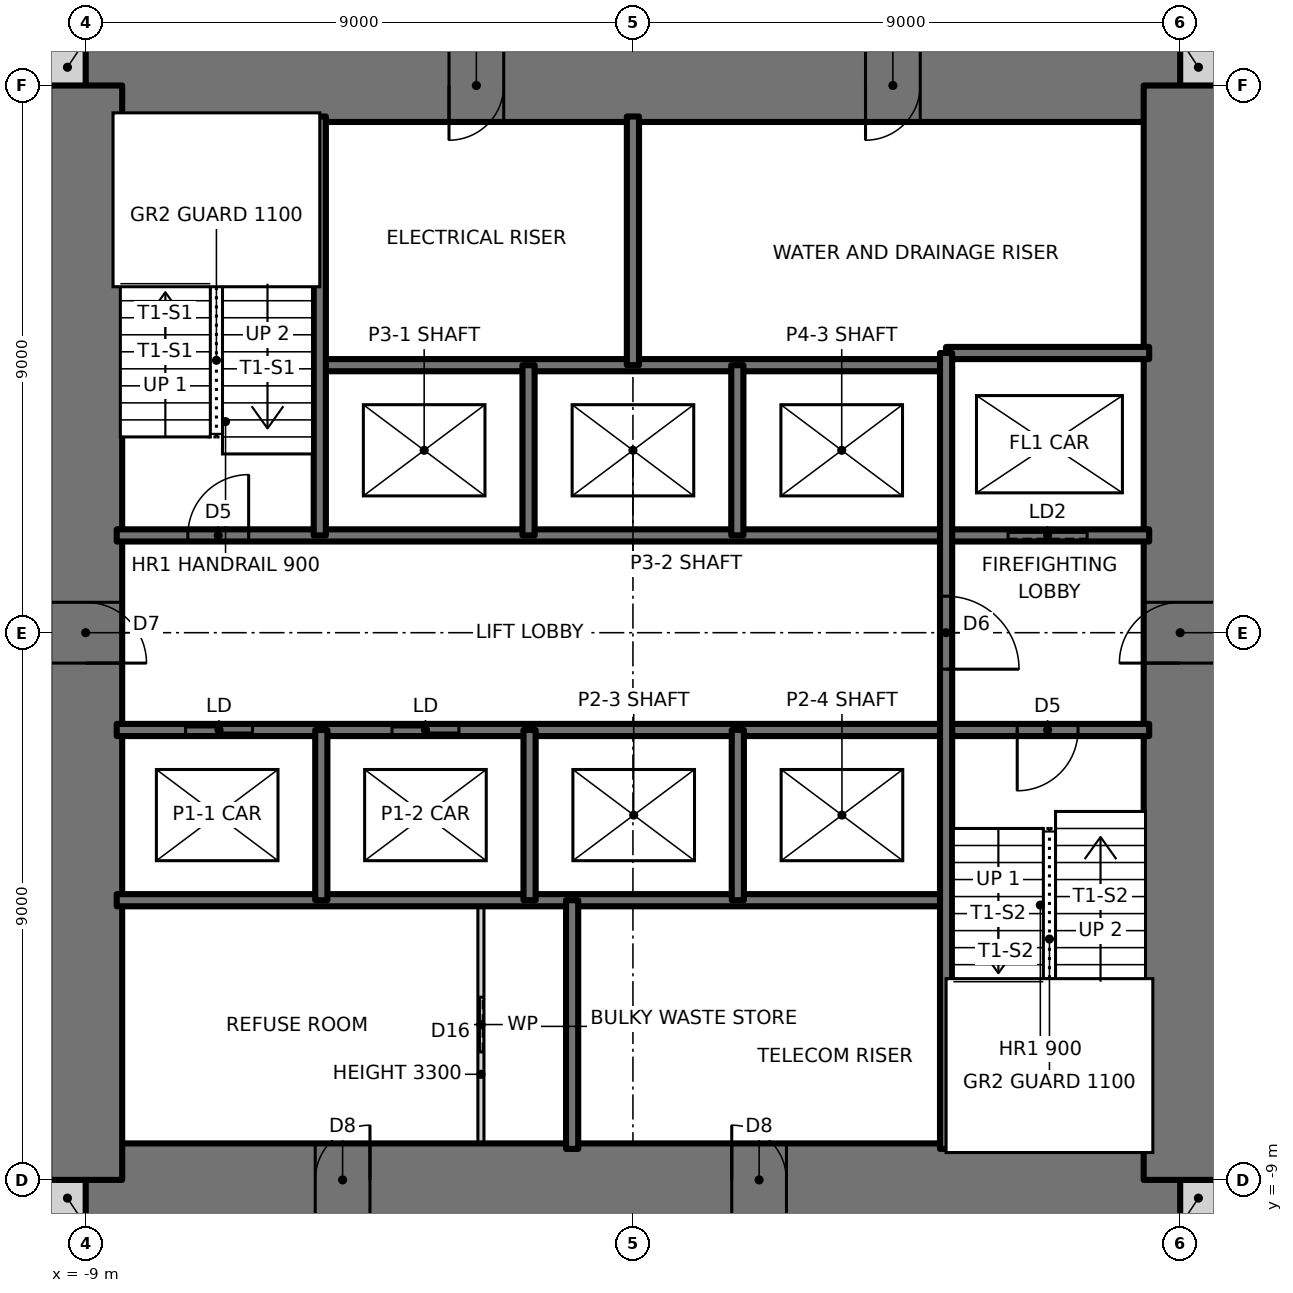
"""IFC4 building model, lengths in metres.
Left out: names, types, materials, properties, quantities, classifications, styles, units other than length and angle.
Written with IfcOpenShell. Run it as: python <this file> out.ifc"""

import sys

from ifc_helpers import new_model, si_unit, direction, frame, frame_2d, origin, place, context, subcontext, project, spatial, rectangle, extrude, element, fill, save


model = new_model("IFC4")
c1 = context("Model", 3, precision=1e-05, world=origin(), true_north=direction((0.0, 1.0)))
c2 = subcontext(c1, "Body", "Model", "MODEL_VIEW")
j1 = project(units=[si_unit("LENGTHUNIT", "METRE"), si_unit("PLANEANGLEUNIT", "RADIAN")], contexts=[c1])
p1 = place(None, origin())
s1 = spatial("IfcSite", under=j1, at=p1, CompositionType="ELEMENT")
p2 = place(p1, origin())
s2 = spatial("IfcBuilding", under=s1, at=p2, CompositionType="ELEMENT")
p3 = place(p2, frame((0.0, 0.0, 43.0)))
s3 = spatial("IfcBuildingStorey", under=s2, at=p3, CompositionType="ELEMENT", Elevation=43.0)
for number, where, z_axis, x_axis in (
    (1, (-9.6, -9.3, 0.0), (0.0, 0.0, 1.0), (1.0, 0.0, 0.0)),
    (2, (9.0, -9.3, 0.0), (0.0, 0.0, 1.0), (1.0, 0.0, 0.0)),
    (3, (9.0, 9.3, 0.0), (0.0, 0.0, 1.0), (1.0, 0.0, 0.0)),
    (4, (-9.6, 9.3, 0.0), (0.0, 0.0, 1.0), (1.0, 0.0, 0.0)),
):
    element("IfcWall", number, at=place(p3, frame(where, z_axis=z_axis, x_axis=x_axis)), inside=s3, PredefinedType="SOLIDWALL", context=c2, shape_type="SweptSolid", body=[
        extrude(rectangle(XDim=0.6, YDim=0.6, at=frame_2d((0.3, 0.0))), origin(), (0.0, 0.0, 1.0), 3.5),
    ])
p4 = place(p3, frame((-9.0, -9.0, 0.0), z_axis=(0.0, 0.0, 1.0), x_axis=(1.0, 0.0, 0.0)))
e5 = element("IfcWall", 5, at=p4, inside=s3, PredefinedType="SHEAR", context=c2, shape_type="SweptSolid", body=[
    extrude(rectangle(XDim=18.0, YDim=1.2, at=frame_2d((9.0, 0.0))), origin(), (0.0, 0.0, 1.0), 3.5),
])
p5 = place(p4, frame((3.775, 0.0, 0.0)))
e6 = element("IfcOpeningElement", 6, at=p5, cuts=e5, PredefinedType="OPENING", context=c2, shape_type="SweptSolid", body=[
    extrude(rectangle(XDim=0.9, YDim=2.1, at=frame_2d((0.45, 1.05))), frame((0.0, 0.61, 0.0), z_axis=(0.0, -1.0, 0.0), x_axis=(1.0, 0.0, 0.0)), (0.0, 0.0, 1.0), 1.22),
])
p6 = place(p4, frame((10.625, 0.0, 0.0)))
e7 = element("IfcOpeningElement", 7, at=p6, cuts=e5, PredefinedType="OPENING", context=c2, shape_type="SweptSolid", body=[
    extrude(rectangle(XDim=0.9, YDim=2.1, at=frame_2d((0.45, 1.05))), frame((0.0, 0.61, 0.0), z_axis=(0.0, -1.0, 0.0), x_axis=(1.0, 0.0, 0.0)), (0.0, 0.0, 1.0), 1.22),
])
p7 = place(p3, frame((9.0, 9.0, 0.0), z_axis=(0.0, 0.0, 1.0), x_axis=(-1.0, 0.0, 0.0)))
e8 = element("IfcWall", 8, at=p7, inside=s3, PredefinedType="SHEAR", context=c2, shape_type="SweptSolid", body=[
    extrude(rectangle(XDim=18.0, YDim=1.2, at=frame_2d((9.0, 0.0))), origin(), (0.0, 0.0, 1.0), 3.5),
])
p8 = place(p7, frame((11.125, 0.0, 0.0)))
e9 = element("IfcOpeningElement", 9, at=p8, cuts=e8, PredefinedType="OPENING", context=c2, shape_type="SweptSolid", body=[
    extrude(rectangle(XDim=0.9, YDim=2.1, at=frame_2d((0.45, 1.05))), frame((0.0, 0.61, 0.0), z_axis=(0.0, -1.0, 0.0), x_axis=(1.0, 0.0, 0.0)), (0.0, 0.0, 1.0), 1.22),
])
p9 = place(p7, frame((4.275, 0.0, 0.0)))
e10 = element("IfcOpeningElement", 10, at=p9, cuts=e8, PredefinedType="OPENING", context=c2, shape_type="SweptSolid", body=[
    extrude(rectangle(XDim=0.9, YDim=2.1, at=frame_2d((0.45, 1.05))), frame((0.0, 0.61, 0.0), z_axis=(0.0, -1.0, 0.0), x_axis=(1.0, 0.0, 0.0)), (0.0, 0.0, 1.0), 1.22),
])
p10 = place(p3, frame((9.0, -9.0, 0.0), z_axis=(0.0, 0.0, 1.0), x_axis=(0.0, 1.0, 0.0)))
e11 = element("IfcWall", 11, at=p10, inside=s3, PredefinedType="SHEAR", context=c2, shape_type="SweptSolid", body=[
    extrude(rectangle(XDim=18.0, YDim=1.2, at=frame_2d((9.0, 0.0))), origin(), (0.0, 0.0, 1.0), 3.5),
])
p11 = place(p10, frame((8.5, 0.0, 0.0)))
e12 = element("IfcOpeningElement", 12, at=p11, cuts=e11, PredefinedType="OPENING", context=c2, shape_type="SweptSolid", body=[
    extrude(rectangle(XDim=1.0, YDim=2.1, at=frame_2d((0.5, 1.05))), frame((0.0, 0.61, 0.0), z_axis=(0.0, -1.0, 0.0), x_axis=(1.0, 0.0, 0.0)), (0.0, 0.0, 1.0), 1.22),
])
p12 = place(p3, frame((-9.0, 9.0, 0.0), z_axis=(0.0, 0.0, 1.0), x_axis=(0.0, -1.0, 0.0)))
e13 = element("IfcWall", 13, at=p12, inside=s3, PredefinedType="SHEAR", context=c2, shape_type="SweptSolid", body=[
    extrude(rectangle(XDim=18.0, YDim=1.2, at=frame_2d((9.0, 0.0))), origin(), (0.0, 0.0, 1.0), 3.5),
])
p13 = place(p12, frame((8.5, 0.0, 0.0)))
e14 = element("IfcOpeningElement", 14, at=p13, cuts=e13, PredefinedType="OPENING", context=c2, shape_type="SweptSolid", body=[
    extrude(rectangle(XDim=1.0, YDim=2.1, at=frame_2d((0.5, 1.05))), frame((0.0, 0.61, 0.0), z_axis=(0.0, -1.0, 0.0), x_axis=(1.0, 0.0, 0.0)), (0.0, 0.0, 1.0), 1.22),
])
p14 = place(p3, frame((-8.49, -4.4, 0.0), z_axis=(0.0, 0.0, 1.0), x_axis=(1.0, 0.0, 0.0)))
e15 = element("IfcWall", 15, at=p14, inside=s3, PredefinedType="SOLIDWALL", context=c2, shape_type="SweptSolid", body=[
    extrude(rectangle(XDim=13.64, YDim=0.2, at=frame_2d((6.82, 0.0))), origin(), (0.0, 0.0, 1.0), 3.5),
])
p15 = place(p3, frame((-8.49, -1.6, 0.0), z_axis=(0.0, 0.0, 1.0), x_axis=(1.0, 0.0, 0.0)))
e16 = element("IfcWall", 16, at=p15, inside=s3, PredefinedType="SOLIDWALL", context=c2, shape_type="SweptSolid", body=[
    extrude(rectangle(XDim=16.98, YDim=0.2, at=frame_2d((8.49, 0.0))), origin(), (0.0, 0.0, 1.0), 3.5),
])
p16 = place(p15, frame((14.81, 0.0, 0.0)))
e17 = element("IfcOpeningElement", 17, at=p16, cuts=e16, PredefinedType="OPENING", context=c2, shape_type="SweptSolid", body=[
    extrude(rectangle(XDim=1.0, YDim=2.1, at=frame_2d((0.5, 1.05))), frame((0.0, 0.11, 0.0), z_axis=(0.0, -1.0, 0.0), x_axis=(1.0, 0.0, 0.0)), (0.0, 0.0, 1.0), 0.22),
])
p17 = place(p15, frame((1.133, 0.0, 0.0)))
e18 = element("IfcOpeningElement", 18, at=p17, cuts=e16, PredefinedType="OPENING", context=c2, shape_type="SweptSolid", body=[
    extrude(rectangle(XDim=1.1, YDim=2.1, at=frame_2d((0.55, 1.05))), frame((0.0, 0.11, 0.0), z_axis=(0.0, -1.0, 0.0), x_axis=(1.0, 0.0, 0.0)), (0.0, 0.0, 1.0), 0.22),
])
p18 = place(p15, frame((4.528, 0.0, 0.0)))
e19 = element("IfcOpeningElement", 19, at=p18, cuts=e16, PredefinedType="OPENING", context=c2, shape_type="SweptSolid", body=[
    extrude(rectangle(XDim=1.1, YDim=2.1, at=frame_2d((0.55, 1.05))), frame((0.0, 0.11, 0.0), z_axis=(0.0, -1.0, 0.0), x_axis=(1.0, 0.0, 0.0)), (0.0, 0.0, 1.0), 0.22),
])
p19 = place(p3, frame((-8.49, 1.6, 0.0), z_axis=(0.0, 0.0, 1.0), x_axis=(1.0, 0.0, 0.0)))
e20 = element("IfcWall", 20, at=p19, inside=s3, PredefinedType="SOLIDWALL", context=c2, shape_type="SweptSolid", body=[
    extrude(rectangle(XDim=16.98, YDim=0.2, at=frame_2d((8.49, 0.0))), origin(), (0.0, 0.0, 1.0), 3.5),
])
p20 = place(p19, frame((1.17, 0.0, 0.0)))
e21 = element("IfcOpeningElement", 21, at=p20, cuts=e20, PredefinedType="OPENING", context=c2, shape_type="SweptSolid", body=[
    extrude(rectangle(XDim=1.0, YDim=2.1, at=frame_2d((0.5, 1.05))), frame((0.0, 0.11, 0.0), z_axis=(0.0, -1.0, 0.0), x_axis=(1.0, 0.0, 0.0)), (0.0, 0.0, 1.0), 0.22),
])
p21 = place(p19, frame((14.66, 0.0, 0.0)))
e22 = element("IfcOpeningElement", 22, at=p21, cuts=e20, PredefinedType="OPENING", context=c2, shape_type="SweptSolid", body=[
    extrude(rectangle(XDim=1.3, YDim=2.1, at=frame_2d((0.65, 1.05))), frame((0.0, 0.11, 0.0), z_axis=(0.0, -1.0, 0.0), x_axis=(1.0, 0.0, 0.0)), (0.0, 0.0, 1.0), 0.22),
])
p22 = place(p3, frame((-5.15, 4.4, 0.0), z_axis=(0.0, 0.0, 1.0), x_axis=(1.0, 0.0, 0.0)))
e23 = element("IfcWall", 23, at=p22, inside=s3, PredefinedType="SOLIDWALL", context=c2, shape_type="SweptSolid", body=[
    extrude(rectangle(XDim=10.3, YDim=0.2, at=frame_2d((5.15, 0.0))), origin(), (0.0, 0.0, 1.0), 3.5),
])
p23 = place(p3, frame((5.15, 4.6, 0.0), z_axis=(0.0, 0.0, 1.0), x_axis=(1.0, 0.0, 0.0)))
e24 = element("IfcWall", 24, at=p23, inside=s3, PredefinedType="SOLIDWALL", context=c2, shape_type="SweptSolid", body=[
    extrude(rectangle(XDim=3.34, YDim=0.2, at=frame_2d((1.67, 0.0))), origin(), (0.0, 0.0, 1.0), 3.5),
])
p24 = place(p3, frame((5.15, -8.49, 0.0), z_axis=(0.0, 0.0, 1.0), x_axis=(0.0, 1.0, 0.0)))
e25 = element("IfcWall", 25, at=p24, inside=s3, PredefinedType="SOLIDWALL", context=c2, shape_type="SweptSolid", body=[
    extrude(rectangle(XDim=13.09, YDim=0.2, at=frame_2d((6.545, 0.0))), origin(), (0.0, 0.0, 1.0), 3.5),
])
p25 = place(p24, frame((7.89, 0.0, 0.0)))
e26 = element("IfcOpeningElement", 26, at=p25, cuts=e25, PredefinedType="OPENING", context=c2, shape_type="SweptSolid", body=[
    extrude(rectangle(XDim=1.2, YDim=2.1, at=frame_2d((0.6, 1.05))), frame((0.0, 0.11, 0.0), z_axis=(0.0, -1.0, 0.0), x_axis=(1.0, 0.0, 0.0)), (0.0, 0.0, 1.0), 0.22),
])
for number, where, z_axis, x_axis in (
    (27, (1.725, -4.4, 0.0), (0.0, 0.0, 1.0), (0.0, 1.0, 0.0)),
    (28, (1.717, 1.6, 0.0), (0.0, 0.0, 1.0), (0.0, 1.0, 0.0)),
):
    element("IfcWall", number, at=place(p3, frame(where, z_axis=z_axis, x_axis=x_axis)), inside=s3, PredefinedType="SOLIDWALL", context=c2, shape_type="SweptSolid", body=[
        extrude(rectangle(XDim=2.8, YDim=0.2, at=frame_2d((1.4, 0.0))), origin(), (0.0, 0.0, 1.0), 3.5),
    ])
for number, where, z_axis, x_axis in (
    (29, (0.0, 4.4, 0.0), (0.0, 0.0, 1.0), (0.0, 1.0, 0.0)),
    (30, (-1.0, -8.49, 0.0), (0.0, 0.0, 1.0), (0.0, 1.0, 0.0)),
):
    element("IfcWall", number, at=place(p3, frame(where, z_axis=z_axis, x_axis=x_axis)), inside=s3, PredefinedType="SOLIDWALL", context=c2, shape_type="SweptSolid", body=[
        extrude(rectangle(XDim=4.09, YDim=0.2, at=frame_2d((2.045, 0.0))), origin(), (0.0, 0.0, 1.0), 3.5),
    ])
for number, where, z_axis, x_axis in (
    (31, (-1.7, -4.4, 0.0), (0.0, 0.0, 1.0), (0.0, 1.0, 0.0)),
    (32, (-1.717, 1.6, 0.0), (0.0, 0.0, 1.0), (0.0, 1.0, 0.0)),
):
    element("IfcWall", number, at=place(p3, frame(where, z_axis=z_axis, x_axis=x_axis)), inside=s3, PredefinedType="SOLIDWALL", context=c2, shape_type="SweptSolid", body=[
        extrude(rectangle(XDim=2.8, YDim=0.2, at=frame_2d((1.4, 0.0))), origin(), (0.0, 0.0, 1.0), 3.5),
    ])
p26 = place(p3, frame((-2.5, -8.49, 0.0), z_axis=(0.0, 0.0, 1.0), x_axis=(0.0, 1.0, 0.0)))
e33 = element("IfcWall", 33, at=p26, inside=s3, PredefinedType="PARTITIONING", context=c2, shape_type="SweptSolid", body=[
    extrude(rectangle(XDim=4.09, YDim=0.1, at=frame_2d((2.045, 0.0))), origin(), (0.0, 0.0, 1.0), 3.3),
])
p27 = place(p26, frame((1.595, 0.0, 0.0)))
e34 = element("IfcOpeningElement", 34, at=p27, cuts=e33, PredefinedType="OPENING", context=c2, shape_type="SweptSolid", body=[
    extrude(rectangle(XDim=0.9, YDim=2.1, at=frame_2d((0.45, 1.05))), frame((0.0, 0.06, 0.0), z_axis=(0.0, -1.0, 0.0), x_axis=(1.0, 0.0, 0.0)), (0.0, 0.0, 1.0), 0.12),
])
p28 = place(p3, frame((-5.125, -4.4, 0.0), z_axis=(0.0, 0.0, 1.0), x_axis=(0.0, 1.0, 0.0)))
e35 = element("IfcWall", 35, at=p28, inside=s3, PredefinedType="SOLIDWALL", context=c2, shape_type="SweptSolid", body=[
    extrude(rectangle(XDim=2.8, YDim=0.2, at=frame_2d((1.4, 0.0))), origin(), (0.0, 0.0, 1.0), 3.5),
])
p29 = place(p3, frame((-5.15, 1.6, 0.0), z_axis=(0.0, 0.0, 1.0), x_axis=(0.0, 1.0, 0.0)))
e36 = element("IfcWall", 36, at=p29, inside=s3, PredefinedType="SOLIDWALL", context=c2, shape_type="SweptSolid", body=[
    extrude(rectangle(XDim=6.89, YDim=0.2, at=frame_2d((3.445, 0.0))), origin(), (0.0, 0.0, 1.0), 3.5),
])
p30 = place(p20, origin())
e37 = element("IfcDoor", 37, at=p30, inside=s3, OperationType="SINGLE_SWING_RIGHT", PredefinedType="DOOR", context=c2, shape_type="SweptSolid", body=[
    extrude(rectangle(XDim=1.0, YDim=2.1, at=frame_2d((0.5, 1.05))), frame((0.0, 0.025, 0.0), z_axis=(0.0, -1.0, 0.0), x_axis=(1.0, 0.0, 0.0)), (0.0, 0.0, 1.0), 0.05),
])
fill(e21, e37)
p31 = place(p16, frame((1.0, 0.0, 0.0), z_axis=(0.0, 0.0, 1.0), x_axis=(-1.0, 0.0, 0.0)))
e38 = element("IfcDoor", 38, at=p31, inside=s3, OperationType="SINGLE_SWING_RIGHT", PredefinedType="DOOR", context=c2, shape_type="SweptSolid", body=[
    extrude(rectangle(XDim=1.0, YDim=2.1, at=frame_2d((0.5, 1.05))), frame((0.0, 0.025, 0.0), z_axis=(0.0, -1.0, 0.0), x_axis=(1.0, 0.0, 0.0)), (0.0, 0.0, 1.0), 0.05),
])
fill(e17, e38)
p32 = place(p25, frame((1.2, 0.0, 0.0), z_axis=(0.0, 0.0, 1.0), x_axis=(-1.0, 0.0, 0.0)))
e39 = element("IfcDoor", 39, at=p32, inside=s3, OperationType="SINGLE_SWING_RIGHT", PredefinedType="DOOR", context=c2, shape_type="SweptSolid", body=[
    extrude(rectangle(XDim=1.2, YDim=2.1, at=frame_2d((0.6, 1.05))), frame((0.0, 0.025, 0.0), z_axis=(0.0, -1.0, 0.0), x_axis=(1.0, 0.0, 0.0)), (0.0, 0.0, 1.0), 0.05),
])
fill(e26, e39)
p33 = place(p27, origin())
e40 = element("IfcDoor", 40, at=p33, inside=s3, OperationType="SLIDING_TO_LEFT", PredefinedType="DOOR", context=c2, shape_type="SweptSolid", body=[
    extrude(rectangle(XDim=0.9, YDim=2.1, at=frame_2d((0.45, 1.05))), frame((0.0, 0.025, 0.0), z_axis=(0.0, -1.0, 0.0), x_axis=(1.0, 0.0, 0.0)), (0.0, 0.0, 1.0), 0.05),
])
fill(e34, e40)
p34 = place(p13, origin())
e41 = element("IfcDoor", 41, at=p34, inside=s3, OperationType="SINGLE_SWING_RIGHT", PredefinedType="DOOR", context=c2, shape_type="SweptSolid", body=[
    extrude(rectangle(XDim=1.0, YDim=2.1, at=frame_2d((0.5, 1.05))), frame((0.0, 0.025, 0.0), z_axis=(0.0, -1.0, 0.0), x_axis=(1.0, 0.0, 0.0)), (0.0, 0.0, 1.0), 0.05),
])
fill(e14, e41)
p35 = place(p11, origin())
e42 = element("IfcDoor", 42, at=p35, inside=s3, OperationType="SINGLE_SWING_LEFT", PredefinedType="DOOR", context=c2, shape_type="SweptSolid", body=[
    extrude(rectangle(XDim=1.0, YDim=2.1, at=frame_2d((0.5, 1.05))), frame((0.0, 0.025, 0.0), z_axis=(0.0, -1.0, 0.0), x_axis=(1.0, 0.0, 0.0)), (0.0, 0.0, 1.0), 0.05),
])
fill(e12, e42)
p36 = place(p8, origin())
e43 = element("IfcDoor", 43, at=p36, inside=s3, OperationType="SINGLE_SWING_RIGHT", PredefinedType="DOOR", context=c2, shape_type="SweptSolid", body=[
    extrude(rectangle(XDim=0.9, YDim=2.1, at=frame_2d((0.45, 1.05))), frame((0.0, 0.025, 0.0), z_axis=(0.0, -1.0, 0.0), x_axis=(1.0, 0.0, 0.0)), (0.0, 0.0, 1.0), 0.05),
])
fill(e9, e43)
p37 = place(p9, origin())
e44 = element("IfcDoor", 44, at=p37, inside=s3, OperationType="SINGLE_SWING_RIGHT", PredefinedType="DOOR", context=c2, shape_type="SweptSolid", body=[
    extrude(rectangle(XDim=0.9, YDim=2.1, at=frame_2d((0.45, 1.05))), frame((0.0, 0.025, 0.0), z_axis=(0.0, -1.0, 0.0), x_axis=(1.0, 0.0, 0.0)), (0.0, 0.0, 1.0), 0.05),
])
fill(e10, e44)
p38 = place(p5, origin())
e45 = element("IfcDoor", 45, at=p38, inside=s3, OperationType="SINGLE_SWING_RIGHT", PredefinedType="DOOR", context=c2, shape_type="SweptSolid", body=[
    extrude(rectangle(XDim=0.9, YDim=2.1, at=frame_2d((0.45, 1.05))), frame((0.0, 0.025, 0.0), z_axis=(0.0, -1.0, 0.0), x_axis=(1.0, 0.0, 0.0)), (0.0, 0.0, 1.0), 0.05),
])
fill(e6, e45)
p39 = place(p6, origin())
e46 = element("IfcDoor", 46, at=p39, inside=s3, OperationType="SINGLE_SWING_LEFT", PredefinedType="DOOR", context=c2, shape_type="SweptSolid", body=[
    extrude(rectangle(XDim=0.9, YDim=2.1, at=frame_2d((0.45, 1.05))), frame((0.0, 0.025, 0.0), z_axis=(0.0, -1.0, 0.0), x_axis=(1.0, 0.0, 0.0)), (0.0, 0.0, 1.0), 0.05),
])
fill(e7, e46)
p40 = place(p17, origin())
e47 = element("IfcDoor", 47, at=p40, inside=s3, OperationType="DOUBLE_DOOR_SLIDING", PredefinedType="DOOR", context=c2, shape_type="SweptSolid", body=[
    extrude(rectangle(XDim=1.1, YDim=2.1, at=frame_2d((0.55, 1.05))), frame((0.0, 0.025, 0.0), z_axis=(0.0, -1.0, 0.0), x_axis=(1.0, 0.0, 0.0)), (0.0, 0.0, 1.0), 0.05),
])
fill(e18, e47)
p41 = place(p18, origin())
e48 = element("IfcDoor", 48, at=p41, inside=s3, OperationType="DOUBLE_DOOR_SLIDING", PredefinedType="DOOR", context=c2, shape_type="SweptSolid", body=[
    extrude(rectangle(XDim=1.1, YDim=2.1, at=frame_2d((0.55, 1.05))), frame((0.0, 0.025, 0.0), z_axis=(0.0, -1.0, 0.0), x_axis=(1.0, 0.0, 0.0)), (0.0, 0.0, 1.0), 0.05),
])
fill(e19, e48)
p42 = place(p21, origin())
e49 = element("IfcDoor", 49, at=p42, inside=s3, OperationType="SLIDING_TO_LEFT", PredefinedType="DOOR", context=c2, shape_type="SweptSolid", body=[
    extrude(rectangle(XDim=1.3, YDim=2.1, at=frame_2d((0.65, 1.05))), frame((0.0, 0.025, 0.0), z_axis=(0.0, -1.0, 0.0), x_axis=(1.0, 0.0, 0.0)), (0.0, 0.0, 1.0), 0.05),
])
fill(e22, e49)
save(model, sys.argv[1])
